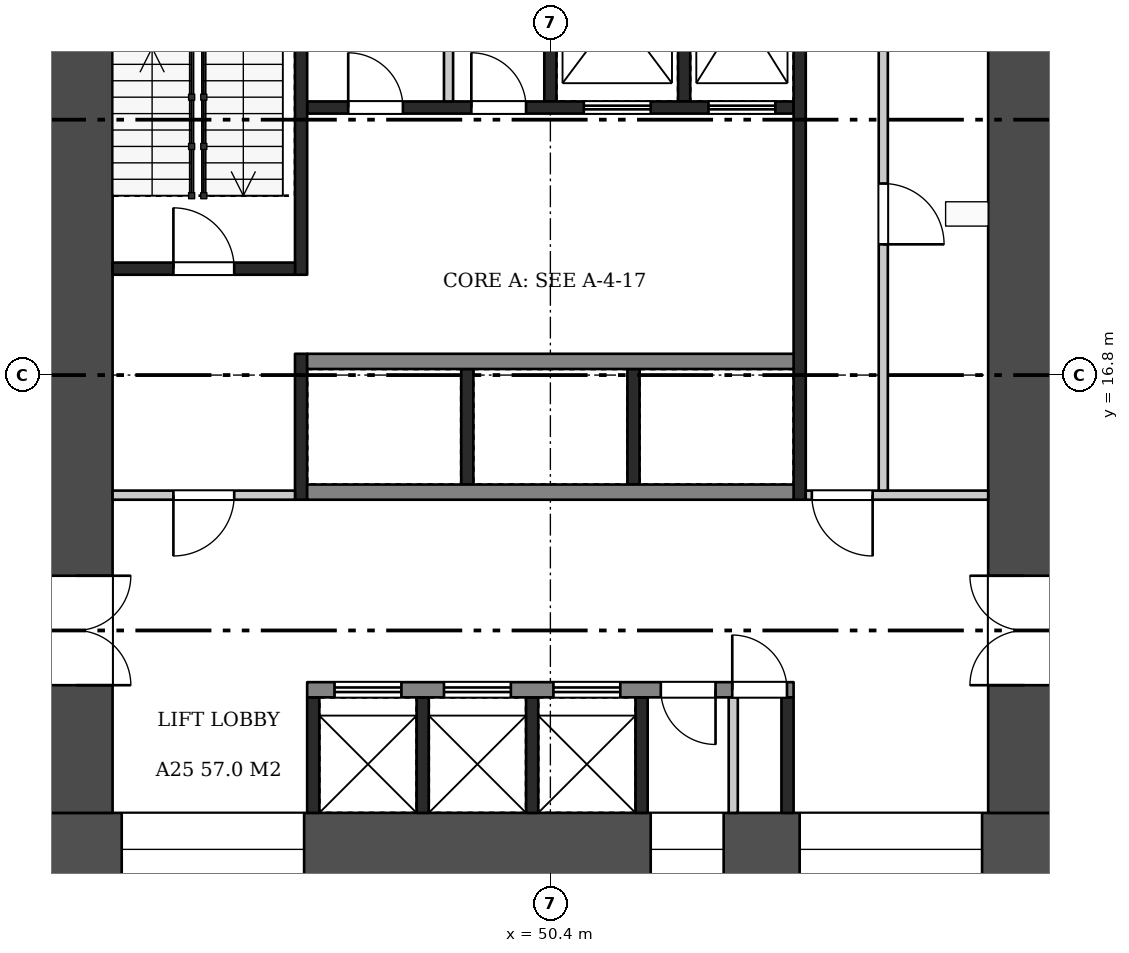
"""IFC4 building model, lengths in metres.
Left out: names, types, materials, properties, quantities, classifications, styles, units other than length and angle.
Written with IfcOpenShell. Run it as: python <this file> out.ifc"""

import sys

from ifc_helpers import new_model, si_unit, direction, frame, frame_2d, origin, place, context, subcontext, project, spatial, rectangle, extrude, element, fill, save


model = new_model("IFC4")
c1 = context("Model", 3, precision=1e-05, world=origin(), true_north=direction((0.0, 1.0)))
c2 = subcontext(c1, "Body", "Model", "MODEL_VIEW")
j1 = project(units=[si_unit("LENGTHUNIT", "METRE"), si_unit("PLANEANGLEUNIT", "RADIAN")], contexts=[c1])
p1 = place(None, origin())
s1 = spatial("IfcSite", under=j1, at=p1, CompositionType="ELEMENT")
p2 = place(p1, origin())
s2 = spatial("IfcBuilding", under=s1, at=p2, CompositionType="ELEMENT")
p3 = place(p2, frame((0.0, 0.0, 102.2)))
s3 = spatial("IfcBuildingStorey", under=s2, at=p3, CompositionType="ELEMENT", Elevation=102.2)
p4 = place(p3, frame((42.0, 9.0, 0.0), z_axis=(0.0, 0.0, 1.0), x_axis=(1.0, 0.0, 0.0)))
e1 = element("IfcWall", 1, at=p4, inside=s3, PredefinedType="SHEAR", context=c2, shape_type="SweptSolid", body=[
    extrude(rectangle(XDim=16.8, YDim=1.2, at=frame_2d((8.4, 0.0))), origin(), (0.0, 0.0, 1.0), 3.22),
])
p5 = place(p4, frame((1.35, 0.0, 0.6)))
e2 = element("IfcOpeningElement", 2, at=p5, cuts=e1, PredefinedType="OPENING", context=c2, shape_type="SweptSolid", body=[
    extrude(rectangle(XDim=3.0, YDim=2.1, at=frame_2d((1.5, 1.05))), frame((0.0, 0.61, 0.0), z_axis=(0.0, -1.0, 0.0), x_axis=(1.0, 0.0, 0.0)), (0.0, 0.0, 1.0), 1.22),
])
p6 = place(p4, frame((10.05, 0.0, 1.6)))
e3 = element("IfcOpeningElement", 3, at=p6, cuts=e1, PredefinedType="OPENING", context=c2, shape_type="SweptSolid", body=[
    extrude(rectangle(XDim=1.2, YDim=1.2, at=frame_2d((0.6, 0.6))), frame((0.0, 0.61, 0.0), z_axis=(0.0, -1.0, 0.0), x_axis=(1.0, 0.0, 0.0)), (0.0, 0.0, 1.0), 1.22),
])
p7 = place(p4, frame((12.5, 0.0, 0.6)))
e4 = element("IfcOpeningElement", 4, at=p7, cuts=e1, PredefinedType="OPENING", context=c2, shape_type="SweptSolid", body=[
    extrude(rectangle(XDim=3.0, YDim=2.1, at=frame_2d((1.5, 1.05))), frame((0.0, 0.61, 0.0), z_axis=(0.0, -1.0, 0.0), x_axis=(1.0, 0.0, 0.0)), (0.0, 0.0, 1.0), 1.22),
])
p8 = place(p3, frame((42.6, 9.6, 0.0), z_axis=(0.0, 0.0, 1.0), x_axis=(0.0, 1.0, 0.0)))
e5 = element("IfcWall", 5, at=p8, inside=s3, PredefinedType="SHEAR", context=c2, shape_type="SweptSolid", body=[
    extrude(rectangle(XDim=14.4, YDim=1.2, at=frame_2d((7.2, 0.0))), origin(), (0.0, 0.0, 1.0), 3.22),
])
p9 = place(p8, frame((2.1, 0.0, 0.0)))
e6 = element("IfcOpeningElement", 6, at=p9, cuts=e5, PredefinedType="OPENING", context=c2, shape_type="SweptSolid", body=[
    extrude(rectangle(XDim=1.8, YDim=2.1, at=frame_2d((0.9, 1.05))), frame((0.0, 0.61, 0.0), z_axis=(0.0, -1.0, 0.0), x_axis=(1.0, 0.0, 0.0)), (0.0, 0.0, 1.0), 1.22),
])
p10 = place(p3, frame((58.2, 9.6, 0.0), z_axis=(0.0, 0.0, 1.0), x_axis=(0.0, 1.0, 0.0)))
e7 = element("IfcWall", 7, at=p10, inside=s3, PredefinedType="SHEAR", context=c2, shape_type="SweptSolid", body=[
    extrude(rectangle(XDim=14.4, YDim=1.2, at=frame_2d((7.2, 0.0))), origin(), (0.0, 0.0, 1.0), 3.22),
])
p11 = place(p10, frame((2.1, 0.0, 0.0)))
e8 = element("IfcOpeningElement", 8, at=p11, cuts=e7, PredefinedType="OPENING", context=c2, shape_type="SweptSolid", body=[
    extrude(rectangle(XDim=1.8, YDim=2.1, at=frame_2d((0.9, 1.05))), frame((0.0, 0.61, 0.0), z_axis=(0.0, -1.0, 0.0), x_axis=(1.0, 0.0, 0.0)), (0.0, 0.0, 1.0), 1.22),
])
for number, where, z_axis, x_axis in (
    (9, (46.5, 9.6, 0.0), (0.0, 0.0, 1.0), (0.0, 1.0, 0.0)),
    (10, (48.3, 9.6, 0.0), (0.0, 0.0, 1.0), (0.0, 1.0, 0.0)),
    (11, (50.1, 9.6, 0.0), (0.0, 0.0, 1.0), (0.0, 1.0, 0.0)),
    (12, (51.9, 9.6, 0.0), (0.0, 0.0, 1.0), (0.0, 1.0, 0.0)),
    (13, (54.3, 9.6, 0.0), (0.0, 0.0, 1.0), (0.0, 1.0, 0.0)),
):
    element("IfcWall", number, at=place(p3, frame(where, z_axis=z_axis, x_axis=x_axis)), inside=s3, PredefinedType="SHEAR", context=c2, shape_type="SweptSolid", body=[
        extrude(rectangle(XDim=1.9, YDim=0.2, at=frame_2d((0.95, 0.0))), origin(), (0.0, 0.0, 1.0), 3.22),
    ])
p12 = place(p3, frame((53.407, 9.6, 0.0), z_axis=(0.0, 0.0, 1.0), x_axis=(0.0, 1.0, 0.0)))
e14 = element("IfcWall", 14, at=p12, inside=s3, PredefinedType="PARTITIONING", context=c2, shape_type="SweptSolid", body=[
    extrude(rectangle(XDim=1.9, YDim=0.15, at=frame_2d((0.95, 0.0))), origin(), (0.0, 0.0, 1.0), 3.22),
])
p13 = place(p3, frame((46.4, 11.625, 0.0), z_axis=(0.0, 0.0, 1.0), x_axis=(1.0, 0.0, 0.0)))
e15 = element("IfcWall", 15, at=p13, inside=s3, PredefinedType="SHEAR", context=c2, shape_type="SweptSolid", body=[
    extrude(rectangle(XDim=8.0, YDim=0.25, at=frame_2d((4.0, 0.0))), origin(), (0.0, 0.0, 1.0), 3.22),
])
p14 = place(p13, frame((0.45, 0.0, 0.0)))
e16 = element("IfcOpeningElement", 16, at=p14, cuts=e15, PredefinedType="OPENING", context=c2, shape_type="SweptSolid", body=[
    extrude(rectangle(XDim=1.1, YDim=2.1, at=frame_2d((0.55, 1.05))), frame((0.0, 0.135, 0.0), z_axis=(0.0, -1.0, 0.0), x_axis=(1.0, 0.0, 0.0)), (0.0, 0.0, 1.0), 0.27),
])
p15 = place(p13, frame((2.25, 0.0, 0.0)))
e17 = element("IfcOpeningElement", 17, at=p15, cuts=e15, PredefinedType="OPENING", context=c2, shape_type="SweptSolid", body=[
    extrude(rectangle(XDim=1.1, YDim=2.1, at=frame_2d((0.55, 1.05))), frame((0.0, 0.135, 0.0), z_axis=(0.0, -1.0, 0.0), x_axis=(1.0, 0.0, 0.0)), (0.0, 0.0, 1.0), 0.27),
])
p16 = place(p13, frame((4.05, 0.0, 0.0)))
e18 = element("IfcOpeningElement", 18, at=p16, cuts=e15, PredefinedType="OPENING", context=c2, shape_type="SweptSolid", body=[
    extrude(rectangle(XDim=1.1, YDim=2.1, at=frame_2d((0.55, 1.05))), frame((0.0, 0.135, 0.0), z_axis=(0.0, -1.0, 0.0), x_axis=(1.0, 0.0, 0.0)), (0.0, 0.0, 1.0), 0.27),
])
p17 = place(p13, frame((5.816, 0.0, 0.0)))
e19 = element("IfcOpeningElement", 19, at=p17, cuts=e15, PredefinedType="OPENING", context=c2, shape_type="SweptSolid", body=[
    extrude(rectangle(XDim=0.9, YDim=2.1, at=frame_2d((0.45, 1.05))), frame((0.0, 0.135, 0.0), z_axis=(0.0, -1.0, 0.0), x_axis=(1.0, 0.0, 0.0)), (0.0, 0.0, 1.0), 0.27),
])
p18 = place(p13, frame((6.991, 0.0, 0.0)))
e20 = element("IfcOpeningElement", 20, at=p18, cuts=e15, PredefinedType="OPENING", context=c2, shape_type="SweptSolid", body=[
    extrude(rectangle(XDim=0.9, YDim=2.1, at=frame_2d((0.45, 1.05))), frame((0.0, 0.135, 0.0), z_axis=(0.0, -1.0, 0.0), x_axis=(1.0, 0.0, 0.0)), (0.0, 0.0, 1.0), 0.27),
])
for number, where, z_axis, x_axis in (
    (21, (49.033, 15.0, 0.0), (0.0, 0.0, 1.0), (0.0, 1.0, 0.0)),
    (22, (51.767, 15.0, 0.0), (0.0, 0.0, 1.0), (0.0, 1.0, 0.0)),
):
    element("IfcWall", number, at=place(p3, frame(where, z_axis=z_axis, x_axis=x_axis)), inside=s3, PredefinedType="SHEAR", context=c2, shape_type="SweptSolid", body=[
        extrude(rectangle(XDim=1.9, YDim=0.2, at=frame_2d((0.95, 0.0))), origin(), (0.0, 0.0, 1.0), 3.22),
    ])
for number, where, z_axis, x_axis in (
    (23, (46.4, 14.875, 0.0), (0.0, 0.0, 1.0), (1.0, 0.0, 0.0)),
    (24, (46.4, 17.025, 0.0), (0.0, 0.0, 1.0), (1.0, 0.0, 0.0)),
):
    element("IfcWall", number, at=place(p3, frame(where, z_axis=z_axis, x_axis=x_axis)), inside=s3, PredefinedType="SHEAR", context=c2, shape_type="SweptSolid", body=[
        extrude(rectangle(XDim=8.0, YDim=0.25, at=frame_2d((4.0, 0.0))), origin(), (0.0, 0.0, 1.0), 3.22),
    ])
for number, where, z_axis, x_axis in (
    (25, (50.4, 21.3, 0.0), (0.0, 0.0, 1.0), (0.0, 1.0, 0.0)),
    (26, (52.6, 21.3, 0.0), (0.0, 0.0, 1.0), (0.0, 1.0, 0.0)),
):
    element("IfcWall", number, at=place(p3, frame(where, z_axis=z_axis, x_axis=x_axis)), inside=s3, PredefinedType="SHEAR", context=c2, shape_type="SweptSolid", body=[
        extrude(rectangle(XDim=2.7, YDim=0.2, at=frame_2d((1.35, 0.0))), origin(), (0.0, 0.0, 1.0), 3.22),
    ])
p19 = place(p3, frame((48.725, 21.3, 0.0), z_axis=(0.0, 0.0, 1.0), x_axis=(0.0, 1.0, 0.0)))
e27 = element("IfcWall", 27, at=p19, inside=s3, PredefinedType="PARTITIONING", context=c2, shape_type="SweptSolid", body=[
    extrude(rectangle(XDim=2.7, YDim=0.15, at=frame_2d((1.35, 0.0))), origin(), (0.0, 0.0, 1.0), 3.22),
])
p20 = place(p3, frame((46.4, 21.2, 0.0), z_axis=(0.0, 0.0, 1.0), x_axis=(1.0, 0.0, 0.0)))
e28 = element("IfcWall", 28, at=p20, inside=s3, PredefinedType="SHEAR", context=c2, shape_type="SweptSolid", body=[
    extrude(rectangle(XDim=8.0, YDim=0.2, at=frame_2d((4.0, 0.0))), origin(), (0.0, 0.0, 1.0), 3.22),
])
p21 = place(p20, frame((0.675, 0.0, 0.0)))
e29 = element("IfcOpeningElement", 29, at=p21, cuts=e28, PredefinedType="OPENING", context=c2, shape_type="SweptSolid", body=[
    extrude(rectangle(XDim=0.9, YDim=2.1, at=frame_2d((0.45, 1.05))), frame((0.0, 0.11, 0.0), z_axis=(0.0, -1.0, 0.0), x_axis=(1.0, 0.0, 0.0)), (0.0, 0.0, 1.0), 0.22),
])
p22 = place(p20, frame((2.7, 0.0, 0.0)))
e30 = element("IfcOpeningElement", 30, at=p22, cuts=e28, PredefinedType="OPENING", context=c2, shape_type="SweptSolid", body=[
    extrude(rectangle(XDim=0.9, YDim=2.1, at=frame_2d((0.45, 1.05))), frame((0.0, 0.11, 0.0), z_axis=(0.0, -1.0, 0.0), x_axis=(1.0, 0.0, 0.0)), (0.0, 0.0, 1.0), 0.22),
])
p23 = place(p20, frame((4.55, 0.0, 0.0)))
e31 = element("IfcOpeningElement", 31, at=p23, cuts=e28, PredefinedType="OPENING", context=c2, shape_type="SweptSolid", body=[
    extrude(rectangle(XDim=1.1, YDim=2.1, at=frame_2d((0.55, 1.05))), frame((0.0, 0.11, 0.0), z_axis=(0.0, -1.0, 0.0), x_axis=(1.0, 0.0, 0.0)), (0.0, 0.0, 1.0), 0.22),
])
p24 = place(p20, frame((6.6, 0.0, 0.0)))
e32 = element("IfcOpeningElement", 32, at=p24, cuts=e28, PredefinedType="OPENING", context=c2, shape_type="SweptSolid", body=[
    extrude(rectangle(XDim=1.1, YDim=2.1, at=frame_2d((0.55, 1.05))), frame((0.0, 0.11, 0.0), z_axis=(0.0, -1.0, 0.0), x_axis=(1.0, 0.0, 0.0)), (0.0, 0.0, 1.0), 0.22),
])
p25 = place(p3, frame((46.3, 14.75, 0.0), z_axis=(0.0, 0.0, 1.0), x_axis=(0.0, 1.0, 0.0)))
e33 = element("IfcWall", 33, at=p25, inside=s3, PredefinedType="SHEAR", context=c2, shape_type="SweptSolid", body=[
    extrude(rectangle(XDim=2.4, YDim=0.2, at=frame_2d((1.2, 0.0))), origin(), (0.0, 0.0, 1.0), 3.22),
])
p26 = place(p3, frame((46.3, 18.45, 0.0), z_axis=(0.0, 0.0, 1.0), x_axis=(0.0, 1.0, 0.0)))
e34 = element("IfcWall", 34, at=p26, inside=s3, PredefinedType="SHEAR", context=c2, shape_type="SweptSolid", body=[
    extrude(rectangle(XDim=5.55, YDim=0.2, at=frame_2d((2.775, 0.0))), origin(), (0.0, 0.0, 1.0), 3.22),
])
p27 = place(p3, frame((43.2, 14.825, 0.0), z_axis=(0.0, 0.0, 1.0), x_axis=(1.0, 0.0, 0.0)))
e35 = element("IfcWall", 35, at=p27, inside=s3, PredefinedType="PARTITIONING", context=c2, shape_type="SweptSolid", body=[
    extrude(rectangle(XDim=3.0, YDim=0.15, at=frame_2d((1.5, 0.0))), origin(), (0.0, 0.0, 1.0), 3.22),
])
p28 = place(p27, frame((1.0, 0.0, 0.0)))
e36 = element("IfcOpeningElement", 36, at=p28, cuts=e35, PredefinedType="OPENING", context=c2, shape_type="SweptSolid", body=[
    extrude(rectangle(XDim=1.0, YDim=2.1, at=frame_2d((0.5, 1.05))), frame((0.0, 0.085, 0.0), z_axis=(0.0, -1.0, 0.0), x_axis=(1.0, 0.0, 0.0)), (0.0, 0.0, 1.0), 0.17),
])
p29 = place(p3, frame((43.2, 18.55, 0.0), z_axis=(0.0, 0.0, 1.0), x_axis=(1.0, 0.0, 0.0)))
e37 = element("IfcWall", 37, at=p29, inside=s3, PredefinedType="SHEAR", context=c2, shape_type="SweptSolid", body=[
    extrude(rectangle(XDim=3.0, YDim=0.2, at=frame_2d((1.5, 0.0))), origin(), (0.0, 0.0, 1.0), 3.22),
])
p30 = place(p29, frame((1.0, 0.0, 0.0)))
e38 = element("IfcOpeningElement", 38, at=p30, cuts=e37, PredefinedType="OPENING", context=c2, shape_type="SweptSolid", body=[
    extrude(rectangle(XDim=1.0, YDim=2.1, at=frame_2d((0.5, 1.05))), frame((0.0, 0.11, 0.0), z_axis=(0.0, -1.0, 0.0), x_axis=(1.0, 0.0, 0.0)), (0.0, 0.0, 1.0), 0.22),
])
p31 = place(p3, frame((54.5, 14.75, 0.0), z_axis=(0.0, 0.0, 1.0), x_axis=(0.0, 1.0, 0.0)))
e39 = element("IfcWall", 39, at=p31, inside=s3, PredefinedType="SHEAR", context=c2, shape_type="SweptSolid", body=[
    extrude(rectangle(XDim=9.25, YDim=0.2, at=frame_2d((4.625, 0.0))), origin(), (0.0, 0.0, 1.0), 3.22),
])
p32 = place(p3, frame((54.6, 14.825, 0.0), z_axis=(0.0, 0.0, 1.0), x_axis=(1.0, 0.0, 0.0)))
e40 = element("IfcWall", 40, at=p32, inside=s3, PredefinedType="PARTITIONING", context=c2, shape_type="SweptSolid", body=[
    extrude(rectangle(XDim=3.0, YDim=0.15, at=frame_2d((1.5, 0.0))), origin(), (0.0, 0.0, 1.0), 3.22),
])
p33 = place(p32, frame((0.1, 0.0, 0.0)))
e41 = element("IfcOpeningElement", 41, at=p33, cuts=e40, PredefinedType="OPENING", context=c2, shape_type="SweptSolid", body=[
    extrude(rectangle(XDim=1.0, YDim=2.1, at=frame_2d((0.5, 1.05))), frame((0.0, 0.085, 0.0), z_axis=(0.0, -1.0, 0.0), x_axis=(1.0, 0.0, 0.0)), (0.0, 0.0, 1.0), 0.17),
])
p34 = place(p3, frame((55.875, 14.9, 0.0), z_axis=(0.0, 0.0, 1.0), x_axis=(0.0, 1.0, 0.0)))
e42 = element("IfcWall", 42, at=p34, inside=s3, PredefinedType="PARTITIONING", context=c2, shape_type="SweptSolid", body=[
    extrude(rectangle(XDim=9.1, YDim=0.15, at=frame_2d((4.55, 0.0))), origin(), (0.0, 0.0, 1.0), 3.22),
])
p35 = place(p34, frame((4.05, 0.0, 0.0)))
e43 = element("IfcOpeningElement", 43, at=p35, cuts=e42, PredefinedType="OPENING", context=c2, shape_type="SweptSolid", body=[
    extrude(rectangle(XDim=1.0, YDim=2.1, at=frame_2d((0.5, 1.05))), frame((0.0, 0.085, 0.0), z_axis=(0.0, -1.0, 0.0), x_axis=(1.0, 0.0, 0.0)), (0.0, 0.0, 1.0), 0.17),
])
p36 = place(p9, frame((1.8, 0.0, 0.0), z_axis=(0.0, 0.0, 1.0), x_axis=(-1.0, 0.0, 0.0)))
e44 = element("IfcDoor", 44, at=p36, inside=s3, OperationType="DOUBLE_DOOR_SINGLE_SWING", PredefinedType="DOOR", context=c2, shape_type="SweptSolid", body=[
    extrude(rectangle(XDim=1.8, YDim=2.1, at=frame_2d((0.9, 1.05))), frame((0.0, 0.025, 0.0), z_axis=(0.0, -1.0, 0.0), x_axis=(1.0, 0.0, 0.0)), (0.0, 0.0, 1.0), 0.05),
])
fill(e6, e44)
p37 = place(p11, origin())
e45 = element("IfcDoor", 45, at=p37, inside=s3, OperationType="DOUBLE_DOOR_SINGLE_SWING", PredefinedType="DOOR", context=c2, shape_type="SweptSolid", body=[
    extrude(rectangle(XDim=1.8, YDim=2.1, at=frame_2d((0.9, 1.05))), frame((0.0, 0.025, 0.0), z_axis=(0.0, -1.0, 0.0), x_axis=(1.0, 0.0, 0.0)), (0.0, 0.0, 1.0), 0.05),
])
fill(e8, e45)
p38 = place(p14, origin())
e46 = element("IfcDoor", 46, at=p38, inside=s3, OperationType="DOUBLE_DOOR_SLIDING", PredefinedType="DOOR", context=c2, shape_type="SweptSolid", body=[
    extrude(rectangle(XDim=1.1, YDim=2.1, at=frame_2d((0.55, 1.05))), frame((0.0, 0.025, 0.0), z_axis=(0.0, -1.0, 0.0), x_axis=(1.0, 0.0, 0.0)), (0.0, 0.0, 1.0), 0.05),
])
fill(e16, e46)
p39 = place(p15, origin())
e47 = element("IfcDoor", 47, at=p39, inside=s3, OperationType="DOUBLE_DOOR_SLIDING", PredefinedType="DOOR", context=c2, shape_type="SweptSolid", body=[
    extrude(rectangle(XDim=1.1, YDim=2.1, at=frame_2d((0.55, 1.05))), frame((0.0, 0.025, 0.0), z_axis=(0.0, -1.0, 0.0), x_axis=(1.0, 0.0, 0.0)), (0.0, 0.0, 1.0), 0.05),
])
fill(e17, e47)
p40 = place(p16, origin())
e48 = element("IfcDoor", 48, at=p40, inside=s3, OperationType="DOUBLE_DOOR_SLIDING", PredefinedType="DOOR", context=c2, shape_type="SweptSolid", body=[
    extrude(rectangle(XDim=1.1, YDim=2.1, at=frame_2d((0.55, 1.05))), frame((0.0, 0.025, 0.0), z_axis=(0.0, -1.0, 0.0), x_axis=(1.0, 0.0, 0.0)), (0.0, 0.0, 1.0), 0.05),
])
fill(e18, e48)
p41 = place(p17, frame((0.9, 0.0, 0.0), z_axis=(0.0, 0.0, 1.0), x_axis=(-1.0, 0.0, 0.0)))
e49 = element("IfcDoor", 49, at=p41, inside=s3, OperationType="SINGLE_SWING_LEFT", PredefinedType="DOOR", context=c2, shape_type="SweptSolid", body=[
    extrude(rectangle(XDim=0.9, YDim=2.1, at=frame_2d((0.45, 1.05))), frame((0.0, 0.025, 0.0), z_axis=(0.0, -1.0, 0.0), x_axis=(1.0, 0.0, 0.0)), (0.0, 0.0, 1.0), 0.05),
])
fill(e19, e49)
p42 = place(p18, origin())
e50 = element("IfcDoor", 50, at=p42, inside=s3, OperationType="SINGLE_SWING_LEFT", PredefinedType="DOOR", context=c2, shape_type="SweptSolid", body=[
    extrude(rectangle(XDim=0.9, YDim=2.1, at=frame_2d((0.45, 1.05))), frame((0.0, 0.025, 0.0), z_axis=(0.0, -1.0, 0.0), x_axis=(1.0, 0.0, 0.0)), (0.0, 0.0, 1.0), 0.05),
])
fill(e20, e50)
p43 = place(p21, origin())
e51 = element("IfcDoor", 51, at=p43, inside=s3, OperationType="SINGLE_SWING_LEFT", PredefinedType="DOOR", context=c2, shape_type="SweptSolid", body=[
    extrude(rectangle(XDim=0.9, YDim=2.1, at=frame_2d((0.45, 1.05))), frame((0.0, 0.025, 0.0), z_axis=(0.0, -1.0, 0.0), x_axis=(1.0, 0.0, 0.0)), (0.0, 0.0, 1.0), 0.05),
])
fill(e29, e51)
p44 = place(p22, origin())
e52 = element("IfcDoor", 52, at=p44, inside=s3, OperationType="SINGLE_SWING_LEFT", PredefinedType="DOOR", context=c2, shape_type="SweptSolid", body=[
    extrude(rectangle(XDim=0.9, YDim=2.1, at=frame_2d((0.45, 1.05))), frame((0.0, 0.025, 0.0), z_axis=(0.0, -1.0, 0.0), x_axis=(1.0, 0.0, 0.0)), (0.0, 0.0, 1.0), 0.05),
])
fill(e30, e52)
p45 = place(p23, origin())
e53 = element("IfcDoor", 53, at=p45, inside=s3, OperationType="DOUBLE_DOOR_SLIDING", PredefinedType="DOOR", context=c2, shape_type="SweptSolid", body=[
    extrude(rectangle(XDim=1.1, YDim=2.1, at=frame_2d((0.55, 1.05))), frame((0.0, 0.025, 0.0), z_axis=(0.0, -1.0, 0.0), x_axis=(1.0, 0.0, 0.0)), (0.0, 0.0, 1.0), 0.05),
])
fill(e31, e53)
p46 = place(p24, origin())
e54 = element("IfcDoor", 54, at=p46, inside=s3, OperationType="DOUBLE_DOOR_SLIDING", PredefinedType="DOOR", context=c2, shape_type="SweptSolid", body=[
    extrude(rectangle(XDim=1.1, YDim=2.1, at=frame_2d((0.55, 1.05))), frame((0.0, 0.025, 0.0), z_axis=(0.0, -1.0, 0.0), x_axis=(1.0, 0.0, 0.0)), (0.0, 0.0, 1.0), 0.05),
])
fill(e32, e54)
p47 = place(p28, frame((1.0, 0.0, 0.0), z_axis=(0.0, 0.0, 1.0), x_axis=(-1.0, 0.0, 0.0)))
e55 = element("IfcDoor", 55, at=p47, inside=s3, OperationType="SINGLE_SWING_RIGHT", PredefinedType="DOOR", context=c2, shape_type="SweptSolid", body=[
    extrude(rectangle(XDim=1.0, YDim=2.1, at=frame_2d((0.5, 1.05))), frame((0.0, 0.025, 0.0), z_axis=(0.0, -1.0, 0.0), x_axis=(1.0, 0.0, 0.0)), (0.0, 0.0, 1.0), 0.05),
])
fill(e36, e55)
p48 = place(p30, origin())
e56 = element("IfcDoor", 56, at=p48, inside=s3, OperationType="SINGLE_SWING_LEFT", PredefinedType="DOOR", context=c2, shape_type="SweptSolid", body=[
    extrude(rectangle(XDim=1.0, YDim=2.1, at=frame_2d((0.5, 1.05))), frame((0.0, 0.025, 0.0), z_axis=(0.0, -1.0, 0.0), x_axis=(1.0, 0.0, 0.0)), (0.0, 0.0, 1.0), 0.05),
])
fill(e38, e56)
p49 = place(p33, frame((1.0, 0.0, 0.0), z_axis=(0.0, 0.0, 1.0), x_axis=(-1.0, 0.0, 0.0)))
e57 = element("IfcDoor", 57, at=p49, inside=s3, OperationType="SINGLE_SWING_LEFT", PredefinedType="DOOR", context=c2, shape_type="SweptSolid", body=[
    extrude(rectangle(XDim=1.0, YDim=2.1, at=frame_2d((0.5, 1.05))), frame((0.0, 0.025, 0.0), z_axis=(0.0, -1.0, 0.0), x_axis=(1.0, 0.0, 0.0)), (0.0, 0.0, 1.0), 0.05),
])
fill(e41, e57)
p50 = place(p35, frame((1.0, 0.0, 0.0), z_axis=(0.0, 0.0, 1.0), x_axis=(-1.0, 0.0, 0.0)))
e58 = element("IfcDoor", 58, at=p50, inside=s3, OperationType="SINGLE_SWING_RIGHT", PredefinedType="DOOR", context=c2, shape_type="SweptSolid", body=[
    extrude(rectangle(XDim=1.0, YDim=2.1, at=frame_2d((0.5, 1.05))), frame((0.0, 0.025, 0.0), z_axis=(0.0, -1.0, 0.0), x_axis=(1.0, 0.0, 0.0)), (0.0, 0.0, 1.0), 0.05),
])
fill(e43, e58)
p51 = place(p5, origin())
e59 = element("IfcWindow", 59, at=p51, inside=s3, PartitioningType="SINGLE_PANEL", PredefinedType="WINDOW", context=c2, shape_type="SweptSolid", body=[
    extrude(rectangle(XDim=3.0, YDim=2.1, at=frame_2d((1.5, 1.05))), frame((0.0, 0.03, 0.0), z_axis=(0.0, -1.0, 0.0), x_axis=(1.0, 0.0, 0.0)), (0.0, 0.0, 1.0), 0.06),
])
fill(e2, e59)
p52 = place(p6, origin())
e60 = element("IfcWindow", 60, at=p52, inside=s3, PartitioningType="SINGLE_PANEL", PredefinedType="WINDOW", context=c2, shape_type="SweptSolid", body=[
    extrude(rectangle(XDim=1.2, YDim=1.2, at=frame_2d((0.6, 0.6))), frame((0.0, 0.03, 0.0), z_axis=(0.0, -1.0, 0.0), x_axis=(1.0, 0.0, 0.0)), (0.0, 0.0, 1.0), 0.06),
])
fill(e3, e60)
p53 = place(p7, origin())
e61 = element("IfcWindow", 61, at=p53, inside=s3, PartitioningType="SINGLE_PANEL", PredefinedType="WINDOW", context=c2, shape_type="SweptSolid", body=[
    extrude(rectangle(XDim=3.0, YDim=2.1, at=frame_2d((1.5, 1.05))), frame((0.0, 0.03, 0.0), z_axis=(0.0, -1.0, 0.0), x_axis=(1.0, 0.0, 0.0)), (0.0, 0.0, 1.0), 0.06),
])
fill(e4, e61)
save(model, sys.argv[1])
